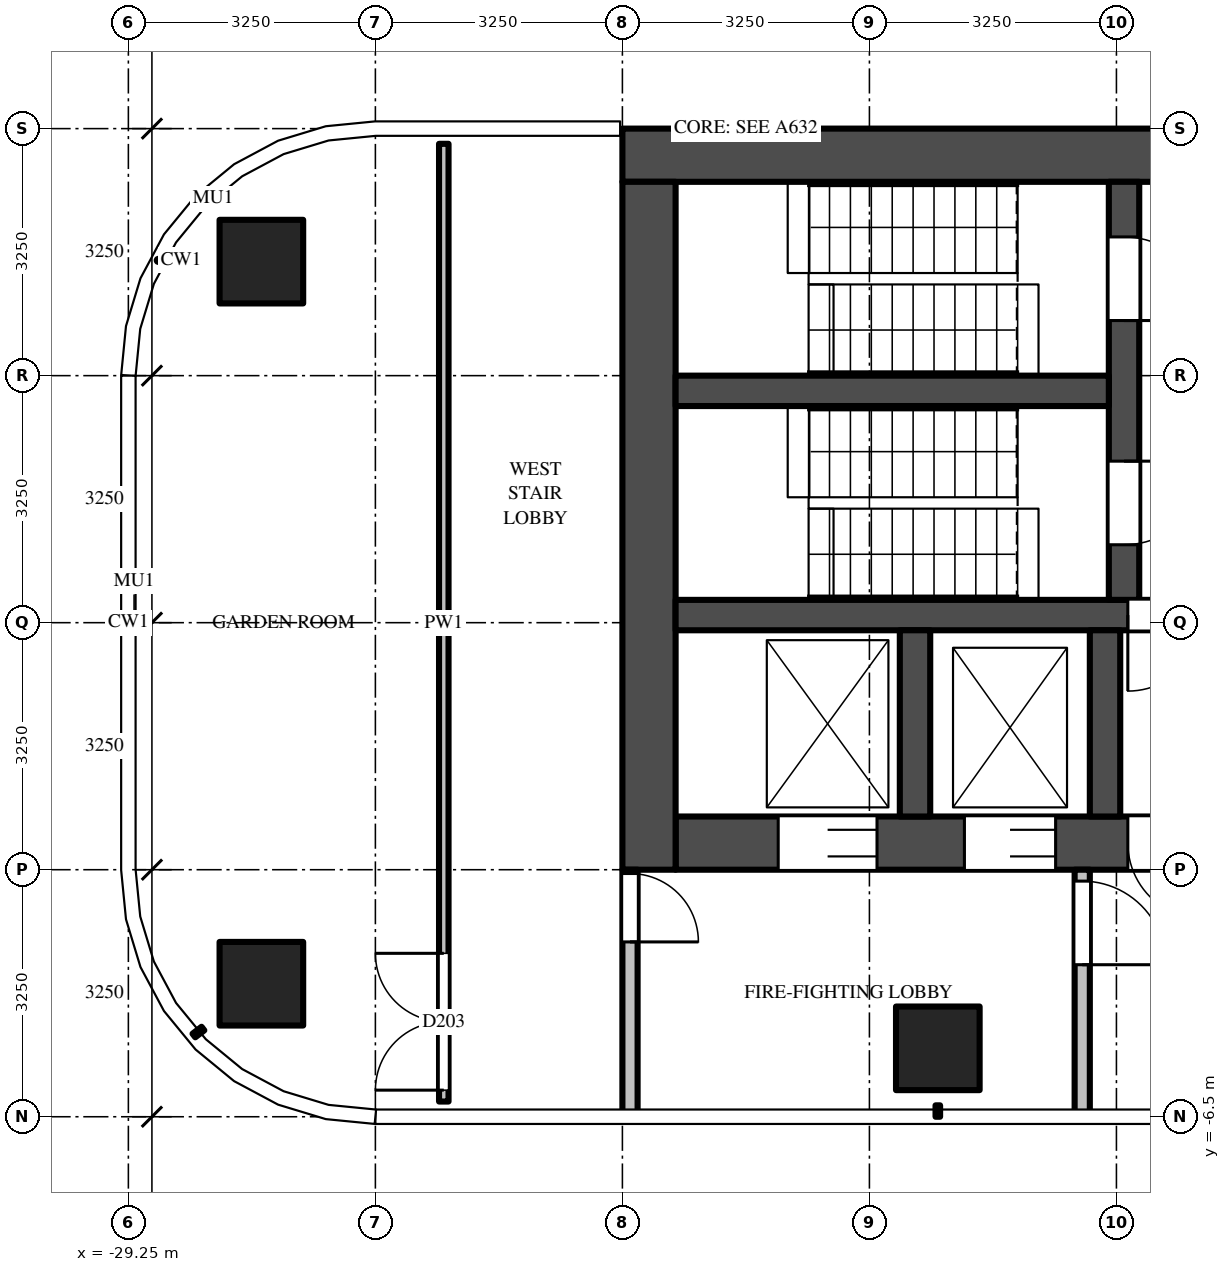
"""IFC4 building model, lengths in metres.
Left out: names, types, materials, properties, quantities, classifications, styles, units other than length and angle.
Written with IfcOpenShell. Run it as: python <this file> out.ifc"""

import sys

from ifc_helpers import new_model, si_unit, direction, frame, frame_2d, origin, origin_2d, place, context, subcontext, project, spatial, rectangle, extrude, source, transform, mapped, element, fill, save


model = new_model("IFC4")
c1 = context("Model", 3, precision=1e-05, world=origin(), true_north=direction((0.0, 1.0)))
c2 = subcontext(c1, "Body", "Model", "MODEL_VIEW")
j1 = project(units=[si_unit("LENGTHUNIT", "METRE"), si_unit("PLANEANGLEUNIT", "RADIAN")], contexts=[c1])
p1 = place(None, origin())
s1 = spatial("IfcSite", under=j1, at=p1, CompositionType="ELEMENT")
p2 = place(p1, origin())
s2 = spatial("IfcBuilding", under=s1, at=p2, CompositionType="ELEMENT")
p3 = place(p2, frame((0.0, 0.0, 251.9)))
s3 = spatial("IfcBuildingStorey", under=s2, at=p3, CompositionType="ELEMENT", Elevation=251.9)
m1 = source(origin(), c2, "Body", "SweptSolid", [
    extrude(rectangle(XDim=1.1, YDim=1.1, at=origin_2d()), origin(), (0.0, 0.0, 1.0), 3.9),
])
for number, where, z_axis, x_axis in (
    (1, (-18.6, -5.6, 0.0), (0.0, 0.0, 1.0), (1.0, 0.0, 0.0)),
    (2, (-27.5, -4.75, 0.0), (0.0, 0.0, 1.0), (1.0, 0.0, 0.0)),
    (3, (-27.5, 4.75, 0.0), (0.0, 0.0, 1.0), (1.0, 0.0, 0.0)),
):
    element("IfcColumn", number, at=place(p3, frame(where, z_axis=z_axis, x_axis=x_axis)), inside=s3, PredefinedType="COLUMN", context=c2, shape_type="MappedRepresentation", body=[
        mapped(m1, transform((0.0, 0.0, 0.0))),
    ])
m2 = source(origin(), c2, "Body", "SweptSolid", [
    extrude(rectangle(XDim=16.6, YDim=0.7, at=frame_2d((8.3, 0.0))), origin(), (0.0, 0.0, 1.0), 3.7),
])
p4 = place(p3, frame((-6.15, 6.15, 0.0), z_axis=(0.0, 0.0, 1.0), x_axis=(-1.0, 0.0, 0.0)))
e4 = element("IfcWall", 4, at=p4, inside=s3, PredefinedType="SHEAR", context=c2, shape_type="MappedRepresentation", body=[
    mapped(m2, transform((0.0, 0.0, 0.0))),
])
m3 = source(origin(), c2, "Body", "SweptSolid", [
    extrude(rectangle(XDim=14.85, YDim=0.7, at=frame_2d((7.425, 0.0))), origin(), (0.0, 0.0, 1.0), 3.7),
])
p5 = place(p3, frame((-7.2, -2.9, 0.0), z_axis=(0.0, 0.0, 1.0), x_axis=(-1.0, 0.0, 0.0)))
e5 = element("IfcWall", 5, at=p5, inside=s3, PredefinedType="SHEAR", context=c2, shape_type="MappedRepresentation", body=[
    mapped(m3, transform((0.0, 0.0, 0.0))),
])
m4 = source(origin(), c2, "Body", "SweptSolid", [
    extrude(rectangle(XDim=1.1, YDim=2.1, at=frame_2d((0.55, 1.05))), frame((0.0, 0.36, 0.0), z_axis=(0.0, -1.0, 0.0), x_axis=(1.0, 0.0, 0.0)), (0.0, 0.0, 1.0), 0.72),
])
p6 = place(p5, frame((0.55, 0.0, 0.0)))
e6 = element("IfcOpeningElement", 6, at=p6, cuts=e5, PredefinedType="OPENING", context=c2, shape_type="MappedRepresentation", body=[
    mapped(m4, transform((0.0, 0.0, 0.0))),
])
p7 = place(p5, frame((3.15, 0.0, 0.0)))
e7 = element("IfcOpeningElement", 7, at=p7, cuts=e5, PredefinedType="OPENING", context=c2, shape_type="MappedRepresentation", body=[
    mapped(m4, transform((0.0, 0.0, 0.0))),
])
m5 = source(origin(), c2, "Body", "SweptSolid", [
    extrude(rectangle(XDim=1.2, YDim=2.1, at=frame_2d((0.6, 1.05))), frame((0.0, 0.36, 0.0), z_axis=(0.0, -1.0, 0.0), x_axis=(1.0, 0.0, 0.0)), (0.0, 0.0, 1.0), 0.72),
])
p8 = place(p5, frame((5.7, 0.0, 0.0)))
e8 = element("IfcOpeningElement", 8, at=p8, cuts=e5, PredefinedType="OPENING", context=c2, shape_type="MappedRepresentation", body=[
    mapped(m5, transform((0.0, 0.0, 0.0))),
])
m6 = source(origin(), c2, "Body", "SweptSolid", [
    extrude(rectangle(XDim=1.3, YDim=2.1, at=frame_2d((0.65, 1.05))), frame((0.0, 0.36, 0.0), z_axis=(0.0, -1.0, 0.0), x_axis=(1.0, 0.0, 0.0)), (0.0, 0.0, 1.0), 0.72),
])
p9 = place(p5, frame((12.2, 0.0, 0.0)))
e9 = element("IfcOpeningElement", 9, at=p9, cuts=e5, PredefinedType="OPENING", context=c2, shape_type="MappedRepresentation", body=[
    mapped(m6, transform((0.0, 0.0, 0.0))),
])
p10 = place(p5, frame((9.85, 0.0, 0.0)))
e10 = element("IfcOpeningElement", 10, at=p10, cuts=e5, PredefinedType="OPENING", context=c2, shape_type="MappedRepresentation", body=[
    mapped(m5, transform((0.0, 0.0, 0.0))),
])
m7 = source(origin(), c2, "Body", "SweptSolid", [
    extrude(rectangle(XDim=1.0, YDim=2.1, at=frame_2d((0.5, 1.05))), frame((0.0, 0.36, 0.0), z_axis=(0.0, -1.0, 0.0), x_axis=(1.0, 0.0, 0.0)), (0.0, 0.0, 1.0), 0.72),
])
p11 = place(p5, frame((7.9, 0.0, 0.0)))
e11 = element("IfcOpeningElement", 11, at=p11, cuts=e5, PredefinedType="OPENING", context=c2, shape_type="MappedRepresentation", body=[
    mapped(m7, transform((0.0, 0.0, 0.0))),
])
m8 = source(origin(), c2, "Body", "SweptSolid", [
    extrude(rectangle(XDim=9.05, YDim=0.7, at=frame_2d((4.525, 0.0))), origin(), (0.0, 0.0, 1.0), 3.7),
])
p12 = place(p3, frame((-22.4, 5.8, 0.0), z_axis=(0.0, 0.0, 1.0), x_axis=(0.0, -1.0, 0.0)))
e12 = element("IfcWall", 12, at=p12, inside=s3, PredefinedType="SHEAR", context=c2, shape_type="MappedRepresentation", body=[
    mapped(m8, transform((0.0, 0.0, 0.0))),
])
m9 = source(origin(), c2, "Body", "SweptSolid", [
    extrude(rectangle(XDim=14.85, YDim=0.4, at=frame_2d((7.425, 0.0))), origin(), (0.0, 0.0, 1.0), 3.7),
])
p13 = place(p3, frame((-7.2, 0.1, 0.0), z_axis=(0.0, 0.0, 1.0), x_axis=(-1.0, 0.0, 0.0)))
e13 = element("IfcWall", 13, at=p13, inside=s3, PredefinedType="SHEAR", context=c2, shape_type="MappedRepresentation", body=[
    mapped(m9, transform((0.0, 0.0, 0.0))),
])
m10 = source(origin(), c2, "Body", "SweptSolid", [
    extrude(rectangle(XDim=1.0, YDim=2.1, at=frame_2d((0.5, 1.05))), frame((0.0, 0.21, 0.0), z_axis=(0.0, -1.0, 0.0), x_axis=(1.0, 0.0, 0.0)), (0.0, 0.0, 1.0), 0.42),
])
p14 = place(p13, frame((7.9, 0.0, 0.0)))
e14 = element("IfcOpeningElement", 14, at=p14, cuts=e13, PredefinedType="OPENING", context=c2, shape_type="MappedRepresentation", body=[
    mapped(m10, transform((0.0, 0.0, 0.0))),
])
m11 = source(origin(), c2, "Body", "SweptSolid", [
    extrude(rectangle(XDim=5.5, YDim=0.4, at=frame_2d((2.75, 0.0))), origin(), (0.0, 0.0, 1.0), 3.7),
])
p15 = place(p3, frame((-16.15, 5.8, 0.0), z_axis=(0.0, 0.0, 1.0), x_axis=(0.0, -1.0, 0.0)))
e15 = element("IfcWall", 15, at=p15, inside=s3, PredefinedType="SHEAR", context=c2, shape_type="MappedRepresentation", body=[
    mapped(m11, transform((0.0, 0.0, 0.0))),
])
m12 = source(origin(), c2, "Body", "SweptSolid", [
    extrude(rectangle(XDim=1.1, YDim=2.1, at=frame_2d((0.55, 1.05))), frame((0.0, 0.21, 0.0), z_axis=(0.0, -1.0, 0.0), x_axis=(1.0, 0.0, 0.0)), (0.0, 0.0, 1.0), 0.42),
])
p16 = place(p15, frame((0.725, 0.0, 0.0)))
e16 = element("IfcOpeningElement", 16, at=p16, cuts=e15, PredefinedType="OPENING", context=c2, shape_type="MappedRepresentation", body=[
    mapped(m12, transform((0.0, 0.0, 0.0))),
])
p17 = place(p15, frame((3.675, 0.0, 0.0)))
e17 = element("IfcOpeningElement", 17, at=p17, cuts=e15, PredefinedType="OPENING", context=c2, shape_type="MappedRepresentation", body=[
    mapped(m12, transform((0.0, 0.0, 0.0))),
])
m13 = source(origin(), c2, "Body", "SweptSolid", [
    extrude(rectangle(XDim=5.7, YDim=0.4, at=frame_2d((2.85, 0.0))), origin(), (0.0, 0.0, 1.0), 3.7),
])
p18 = place(p3, frame((-16.35, 3.05, 0.0), z_axis=(0.0, 0.0, 1.0), x_axis=(-1.0, 0.0, 0.0)))
e18 = element("IfcWall", 18, at=p18, inside=s3, PredefinedType="SHEAR", context=c2, shape_type="MappedRepresentation", body=[
    mapped(m13, transform((0.0, 0.0, 0.0))),
])
m14 = source(origin(), c2, "Body", "SweptSolid", [
    extrude(rectangle(XDim=2.45, YDim=0.4, at=frame_2d((1.225, 0.0))), origin(), (0.0, 0.0, 1.0), 3.7),
])
for number, where, z_axis, x_axis in (
    (19, (-16.4, -0.1, 0.0), (0.0, 0.0, 1.0), (0.0, -1.0, 0.0)),
    (20, (-18.9, -0.1, 0.0), (0.0, 0.0, 1.0), (0.0, -1.0, 0.0)),
):
    element("IfcWall", number, at=place(p3, frame(where, z_axis=z_axis, x_axis=x_axis)), inside=s3, PredefinedType="SHEAR", context=c2, shape_type="MappedRepresentation", body=[
        mapped(m14, transform((0.0, 0.0, 0.0))),
    ])
m15 = source(origin(), c2, "Body", "SweptSolid", [
    extrude(rectangle(XDim=3.25, YDim=0.2, at=frame_2d((1.625, 0.0))), origin(), (0.0, 0.0, 1.0), 3.7),
])
p19 = place(p3, frame((-16.7, -3.25, 0.0), z_axis=(0.0, 0.0, 1.0), x_axis=(0.0, -1.0, 0.0)))
e21 = element("IfcWall", 21, at=p19, inside=s3, PredefinedType="PARTITIONING", context=c2, shape_type="MappedRepresentation", body=[
    mapped(m15, transform((0.0, 0.0, 0.0))),
])
m16 = source(origin(), c2, "Body", "SweptSolid", [
    extrude(rectangle(XDim=1.1, YDim=2.1, at=frame_2d((0.55, 1.05))), frame((0.0, 0.11, 0.0), z_axis=(0.0, -1.0, 0.0), x_axis=(1.0, 0.0, 0.0)), (0.0, 0.0, 1.0), 0.22),
])
p20 = place(p19, frame((0.15, 0.0, 0.0)))
e22 = element("IfcOpeningElement", 22, at=p20, cuts=e21, PredefinedType="OPENING", context=c2, shape_type="MappedRepresentation", body=[
    mapped(m16, transform((0.0, 0.0, 0.0))),
])
p21 = place(p3, frame((-22.65, -3.25, 0.0), z_axis=(0.0, 0.0, 1.0), x_axis=(0.0, -1.0, 0.0)))
e23 = element("IfcWall", 23, at=p21, inside=s3, PredefinedType="PARTITIONING", context=c2, shape_type="MappedRepresentation", body=[
    mapped(m15, transform((0.0, 0.0, 0.0))),
])
m17 = source(origin(), c2, "Body", "SweptSolid", [
    extrude(rectangle(XDim=0.9, YDim=2.1, at=frame_2d((0.45, 1.05))), frame((0.0, 0.11, 0.0), z_axis=(0.0, -1.0, 0.0), x_axis=(1.0, 0.0, 0.0)), (0.0, 0.0, 1.0), 0.22),
])
p22 = place(p21, frame((0.05, 0.0, 0.0)))
e24 = element("IfcOpeningElement", 24, at=p22, cuts=e23, PredefinedType="OPENING", context=c2, shape_type="MappedRepresentation", body=[
    mapped(m17, transform((0.0, 0.0, 0.0))),
])
m18 = source(origin(), c2, "Body", "SweptSolid", [
    extrude(rectangle(XDim=12.6, YDim=0.125, at=frame_2d((6.3, 0.0))), origin(), (0.0, 0.0, 1.0), 2.78),
])
p23 = place(p3, frame((-25.1, -6.3, 0.0), z_axis=(0.0, 0.0, 1.0), x_axis=(0.0, 1.0, 0.0)))
e25 = element("IfcWall", 25, at=p23, inside=s3, PredefinedType="PARTITIONING", context=c2, shape_type="MappedRepresentation", body=[
    mapped(m18, transform((0.0, 0.0, 0.0))),
])
m19 = source(origin(), c2, "Body", "SweptSolid", [
    extrude(rectangle(XDim=1.8, YDim=2.1, at=frame_2d((0.9, 1.05))), frame((0.0, 0.073, 0.0), z_axis=(0.0, -1.0, 0.0), x_axis=(1.0, 0.0, 0.0)), (0.0, 0.0, 1.0), 0.145),
])
p24 = place(p23, frame((0.15, 0.0, 0.0)))
e26 = element("IfcOpeningElement", 26, at=p24, cuts=e25, PredefinedType="OPENING", context=c2, shape_type="MappedRepresentation", body=[
    mapped(m19, transform((0.0, 0.0, 0.0))),
])
m20 = source(origin(), c2, "Body", "SweptSolid", [
    extrude(rectangle(XDim=1.3, YDim=2.1, at=frame_2d((0.65, 1.05))), frame((0.0, -0.275, 0.0), z_axis=(0.0, -1.0, 0.0), x_axis=(1.0, 0.0, 0.0)), (0.0, 0.0, 1.0), 0.05),
])
p25 = place(p9, origin())
e27 = element("IfcDoor", 27, at=p25, inside=s3, OperationType="DOUBLE_DOOR_SLIDING", PredefinedType="DOOR", context=c2, shape_type="MappedRepresentation", body=[
    mapped(m20, transform((0.0, 0.0, 0.0))),
])
fill(e9, e27)
m21 = source(origin(), c2, "Body", "SweptSolid", [
    extrude(rectangle(XDim=1.2, YDim=2.1, at=frame_2d((0.6, 1.05))), frame((0.0, -0.275, 0.0), z_axis=(0.0, -1.0, 0.0), x_axis=(1.0, 0.0, 0.0)), (0.0, 0.0, 1.0), 0.05),
])
p26 = place(p10, origin())
e28 = element("IfcDoor", 28, at=p26, inside=s3, OperationType="DOUBLE_DOOR_SLIDING", PredefinedType="DOOR", context=c2, shape_type="MappedRepresentation", body=[
    mapped(m21, transform((0.0, 0.0, 0.0))),
])
fill(e10, e28)
m22 = source(origin(), c2, "Body", "SweptSolid", [
    extrude(rectangle(XDim=1.1, YDim=2.1, at=frame_2d((0.55, 1.05))), frame((0.0, 0.025, 0.0), z_axis=(0.0, -1.0, 0.0), x_axis=(1.0, 0.0, 0.0)), (0.0, 0.0, 1.0), 0.05),
])
p27 = place(p16, origin())
e29 = element("IfcDoor", 29, at=p27, inside=s3, OperationType="SINGLE_SWING_RIGHT", PredefinedType="DOOR", context=c2, shape_type="MappedRepresentation", body=[
    mapped(m22, transform((0.0, 0.0, 0.0))),
])
fill(e16, e29)
p28 = place(p17, origin())
e30 = element("IfcDoor", 30, at=p28, inside=s3, OperationType="SINGLE_SWING_LEFT", PredefinedType="DOOR", context=c2, shape_type="MappedRepresentation", body=[
    mapped(m22, transform((0.0, 0.0, 0.0))),
])
fill(e17, e30)
m23 = source(origin(), c2, "Body", "SweptSolid", [
    extrude(rectangle(XDim=1.0, YDim=2.1, at=frame_2d((0.5, 1.05))), frame((0.0, 0.025, 0.0), z_axis=(0.0, -1.0, 0.0), x_axis=(1.0, 0.0, 0.0)), (0.0, 0.0, 1.0), 0.05),
])
p29 = place(p14, origin())
e31 = element("IfcDoor", 31, at=p29, inside=s3, OperationType="SINGLE_SWING_RIGHT", PredefinedType="DOOR", context=c2, shape_type="MappedRepresentation", body=[
    mapped(m23, transform((0.0, 0.0, 0.0))),
])
fill(e14, e31)
m24 = source(origin(), c2, "Body", "SweptSolid", [
    extrude(rectangle(XDim=1.0, YDim=2.1, at=frame_2d((0.5, 1.05))), frame((0.0, -0.275, 0.0), z_axis=(0.0, -1.0, 0.0), x_axis=(1.0, 0.0, 0.0)), (0.0, 0.0, 1.0), 0.05),
])
p30 = place(p11, origin())
e32 = element("IfcDoor", 32, at=p30, inside=s3, OperationType="SINGLE_SWING_LEFT", PredefinedType="DOOR", context=c2, shape_type="MappedRepresentation", body=[
    mapped(m24, transform((0.0, 0.0, 0.0))),
])
fill(e11, e32)
p31 = place(p20, origin())
e33 = element("IfcDoor", 33, at=p31, inside=s3, OperationType="SINGLE_SWING_RIGHT", PredefinedType="DOOR", context=c2, shape_type="MappedRepresentation", body=[
    mapped(m22, transform((0.0, 0.0, 0.0))),
])
fill(e22, e33)
m25 = source(origin(), c2, "Body", "SweptSolid", [
    extrude(rectangle(XDim=0.9, YDim=2.1, at=frame_2d((0.45, 1.05))), frame((0.0, 0.025, 0.0), z_axis=(0.0, -1.0, 0.0), x_axis=(1.0, 0.0, 0.0)), (0.0, 0.0, 1.0), 0.05),
])
p32 = place(p22, origin())
e34 = element("IfcDoor", 34, at=p32, inside=s3, OperationType="SINGLE_SWING_RIGHT", PredefinedType="DOOR", context=c2, shape_type="MappedRepresentation", body=[
    mapped(m25, transform((0.0, 0.0, 0.0))),
])
fill(e24, e34)
m26 = source(origin(), c2, "Body", "SweptSolid", [
    extrude(rectangle(XDim=1.8, YDim=2.1, at=frame_2d((0.9, 1.05))), frame((0.0, 0.025, 0.0), z_axis=(0.0, -1.0, 0.0), x_axis=(1.0, 0.0, 0.0)), (0.0, 0.0, 1.0), 0.05),
])
p33 = place(p24, origin())
e35 = element("IfcDoor", 35, at=p33, inside=s3, OperationType="DOUBLE_DOOR_SINGLE_SWING", PredefinedType="DOOR", context=c2, shape_type="MappedRepresentation", body=[
    mapped(m26, transform((0.0, 0.0, 0.0))),
])
fill(e26, e35)
save(model, sys.argv[1])
